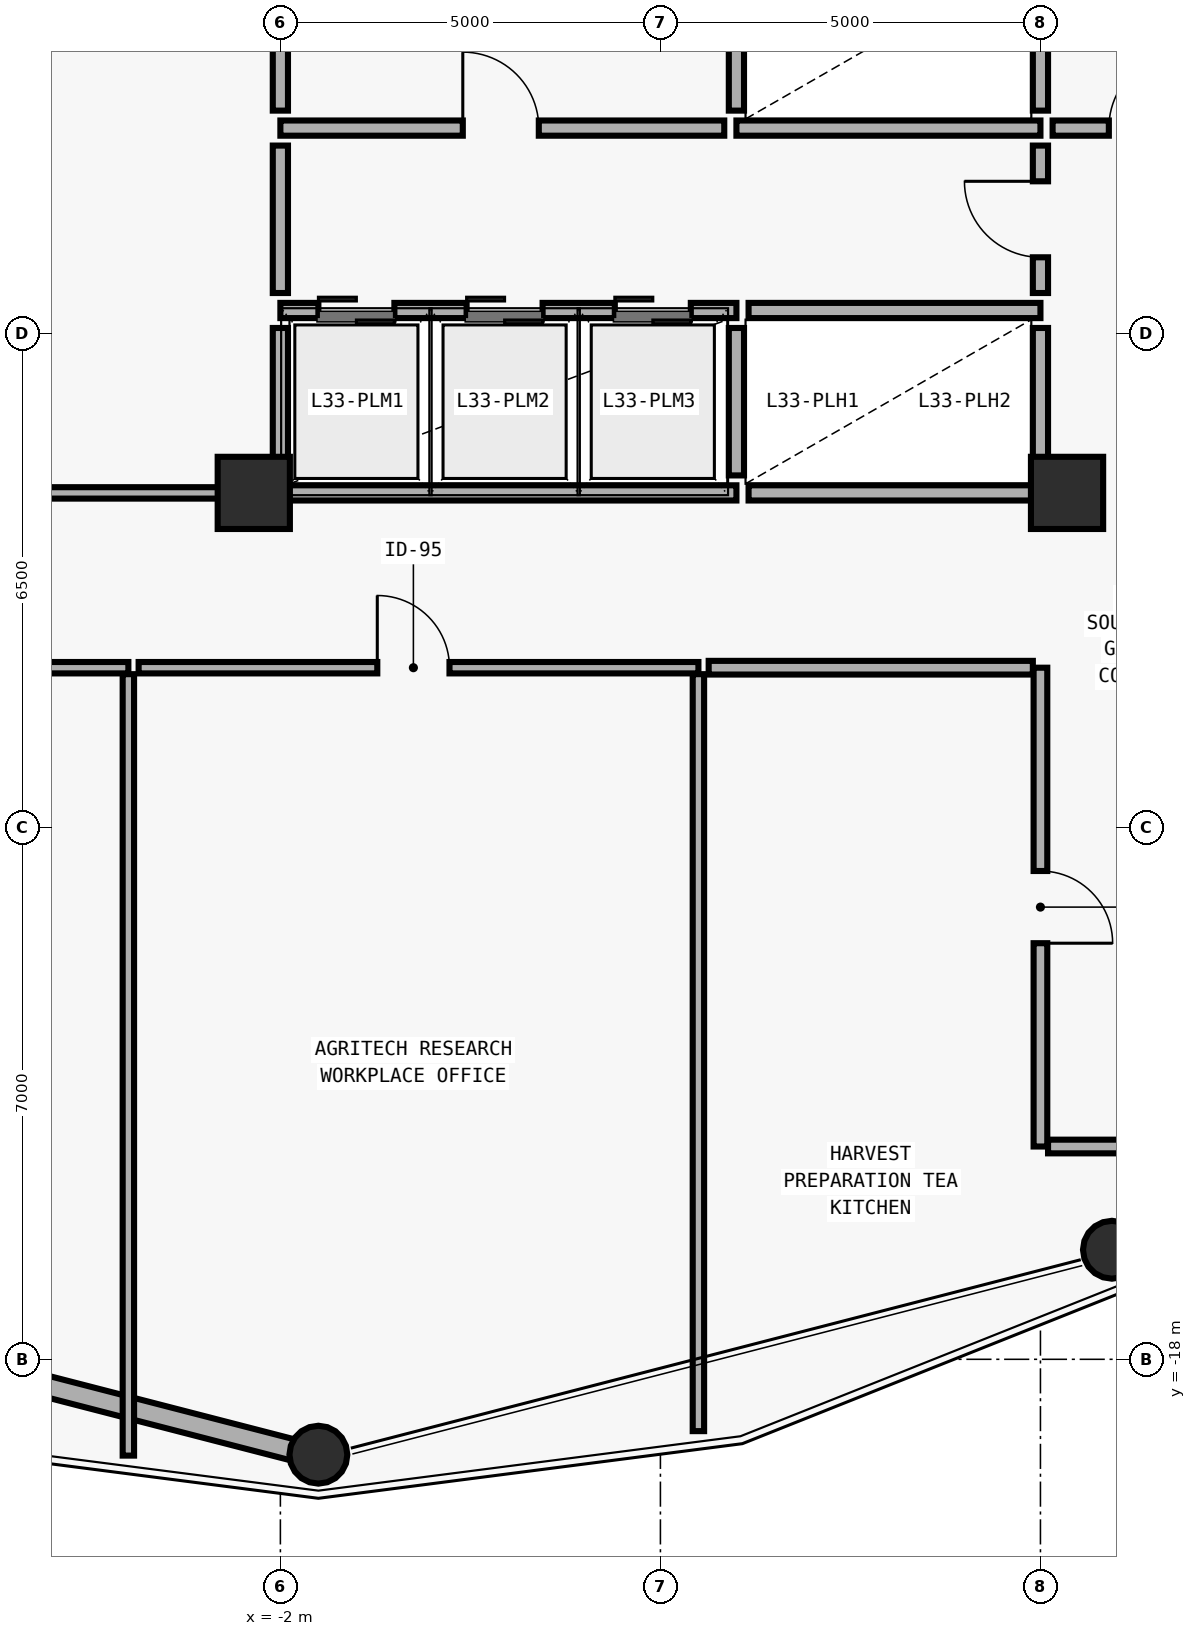
"""IFC4 building model, lengths in metres.
Left out: names, types, materials, properties, quantities, classifications, styles, units other than length and angle.
Written with IfcOpenShell. Run it as: python <this file> out.ifc"""

import sys

from ifc_helpers import new_model, si_unit, direction, frame, frame_2d, origin, origin_2d, place, context, subcontext, project, spatial, rectangle, hollow_circle, extrude, element, fill, save


model = new_model("IFC4")
c1 = context("Model", 3, precision=1e-05, world=origin(), true_north=direction((0.0, 1.0)))
c2 = subcontext(c1, "Body", "Model", "MODEL_VIEW")
j1 = project(units=[si_unit("LENGTHUNIT", "METRE"), si_unit("PLANEANGLEUNIT", "RADIAN")], contexts=[c1])
p1 = place(None, origin())
s1 = spatial("IfcSite", under=j1, at=p1, CompositionType="ELEMENT")
p2 = place(p1, origin())
s2 = spatial("IfcBuilding", under=s1, at=p2, CompositionType="ELEMENT")
p3 = place(p2, frame((0.0, 0.0, 134.4)))
s3 = spatial("IfcBuildingStorey", under=s2, at=p3, CompositionType="ELEMENT", Elevation=134.4)
for number, where, z_axis, x_axis in (
    (1, (-2.35, -6.6, 0.0), (0.0, 0.0, 1.0), (1.0, 0.0, 0.0)),
    (2, (8.35, -6.6, 0.0), (0.0, 0.0, 1.0), (1.0, 0.0, 0.0)),
):
    element("IfcColumn", number, at=place(p3, frame(where, z_axis=z_axis, x_axis=x_axis)), inside=s3, PredefinedType="COLUMN", context=c2, shape_type="SweptSolid", body=[
        extrude(rectangle(XDim=0.95, YDim=0.95, at=origin_2d()), origin(), (0.0, 0.0, 1.0), 3.875),
    ])
p4 = place(p3, frame((-1.5, -19.279, 0.0), z_axis=(0.0, 0.01241083843, 0.999922982579), x_axis=(-1.0, 0.0, 0.0)))
e3 = element("IfcColumn", 3, at=p4, inside=s3, PredefinedType="COLUMN", context=c2, shape_type="SweptSolid", body=[
    extrude(hollow_circle(Radius=0.381, WallThickness=0.028, at=origin_2d()), origin(), (0.0, 0.0, 1.0), 3.875),
])
p5 = place(p3, frame((8.958, -16.579, 0.0), z_axis=(-0.008630735893, 0.010709672276, 0.999905402184), x_axis=(-0.77862958397, -0.627483841199, 0.0)))
e4 = element("IfcColumn", 4, at=p5, inside=s3, PredefinedType="COLUMN", context=c2, shape_type="SweptSolid", body=[
    extrude(hollow_circle(Radius=0.381, WallThickness=0.028, at=origin_2d()), origin(), (0.0, 0.0, 1.0), 3.875),
])
p6 = place(p3, frame((-1.825, -19.195, 0.0), z_axis=(0.0, 0.0, 1.0), x_axis=(-0.968249285974, 0.249986640067, 0.0)))
e5 = element("IfcWall", 5, at=p6, inside=s3, PredefinedType="SOLIDWALL", context=c2, shape_type="SweptSolid", body=[
    extrude(rectangle(XDim=10.128, YDim=0.28, at=frame_2d((5.064, 0.0))), origin(), (0.0, 0.0, 1.0), 3.16),
])
p7 = place(p3, frame((4.0, -1.8, 0.0), z_axis=(0.0, 0.0, 1.0), x_axis=(1.0, 0.0, 0.0)))
e6 = element("IfcWall", 6, at=p7, inside=s3, PredefinedType="SOLIDWALL", context=c2, shape_type="SweptSolid", body=[
    extrude(rectangle(XDim=4.0, YDim=0.2, at=frame_2d((2.0, 0.0))), origin(), (0.0, 0.0, 1.0), 3.64),
])
p8 = place(p3, frame((4.0, -1.57, 0.0), z_axis=(0.0, 0.0, 1.0), x_axis=(0.0, 1.0, 0.0)))
e7 = element("IfcWall", 7, at=p8, inside=s3, PredefinedType="SOLIDWALL", context=c2, shape_type="SweptSolid", body=[
    extrude(rectangle(XDim=1.94, YDim=0.2, at=frame_2d((0.97, 0.0))), origin(), (0.0, 0.0, 1.0), 3.64),
])
p9 = place(p3, frame((8.0, -1.57, 0.0), z_axis=(0.0, 0.0, 1.0), x_axis=(0.0, 1.0, 0.0)))
e8 = element("IfcWall", 8, at=p9, inside=s3, PredefinedType="SOLIDWALL", context=c2, shape_type="SweptSolid", body=[
    extrude(rectangle(XDim=2.05, YDim=0.2, at=frame_2d((1.025, 0.0))), origin(), (0.0, 0.0, 1.0), 3.072),
])
p10 = place(p3, frame((-2.0, -4.2, 0.0), z_axis=(0.0, 0.0, 1.0), x_axis=(1.0, 0.0, 0.0)))
e9 = element("IfcWall", 9, at=p10, inside=s3, PredefinedType="SOLIDWALL", context=c2, shape_type="SweptSolid", body=[
    extrude(rectangle(XDim=6.0, YDim=0.2, at=frame_2d((3.0, 0.0))), origin(), (0.0, 0.0, 1.0), 3.64),
])
p11 = place(p10, frame((0.5, 0.0, 0.0)))
e10 = element("IfcOpeningElement", 10, at=p11, cuts=e9, PredefinedType="OPENING", context=c2, shape_type="SweptSolid", body=[
    extrude(rectangle(XDim=1.0, YDim=2.2, at=frame_2d((0.5, 1.1))), frame((0.0, 0.11, 0.0), z_axis=(0.0, -1.0, 0.0), x_axis=(1.0, 0.0, 0.0)), (0.0, 0.0, 1.0), 0.22),
])
p12 = place(p10, frame((2.45, 0.0, 0.0)))
e11 = element("IfcOpeningElement", 11, at=p12, cuts=e9, PredefinedType="OPENING", context=c2, shape_type="SweptSolid", body=[
    extrude(rectangle(XDim=1.0, YDim=2.2, at=frame_2d((0.5, 1.1))), frame((0.0, 0.11, 0.0), z_axis=(0.0, -1.0, 0.0), x_axis=(1.0, 0.0, 0.0)), (0.0, 0.0, 1.0), 0.22),
])
p13 = place(p10, frame((4.4, 0.0, 0.0)))
e12 = element("IfcOpeningElement", 12, at=p13, cuts=e9, PredefinedType="OPENING", context=c2, shape_type="SweptSolid", body=[
    extrude(rectangle(XDim=1.0, YDim=2.2, at=frame_2d((0.5, 1.1))), frame((0.0, 0.11, 0.0), z_axis=(0.0, -1.0, 0.0), x_axis=(1.0, 0.0, 0.0)), (0.0, 0.0, 1.0), 0.22),
])
p14 = place(p3, frame((-2.0, -6.6, 0.0), z_axis=(0.0, 0.0, 1.0), x_axis=(1.0, 0.0, 0.0)))
e13 = element("IfcWall", 13, at=p14, inside=s3, PredefinedType="SOLIDWALL", context=c2, shape_type="SweptSolid", body=[
    extrude(rectangle(XDim=6.0, YDim=0.2, at=frame_2d((3.0, 0.0))), origin(), (0.0, 0.0, 1.0), 3.222),
])
p15 = place(p3, frame((-2.0, -6.37, 0.0), z_axis=(0.0, 0.0, 1.0), x_axis=(0.0, 1.0, 0.0)))
e14 = element("IfcWall", 14, at=p15, inside=s3, PredefinedType="SOLIDWALL", context=c2, shape_type="SweptSolid", body=[
    extrude(rectangle(XDim=1.94, YDim=0.2, at=frame_2d((0.97, 0.0))), origin(), (0.0, 0.0, 1.0), 3.022),
])
p16 = place(p3, frame((4.16, -4.2, 0.0), z_axis=(0.0, 0.0, 1.0), x_axis=(1.0, 0.0, 0.0)))
e15 = element("IfcWall", 15, at=p16, inside=s3, PredefinedType="SOLIDWALL", context=c2, shape_type="SweptSolid", body=[
    extrude(rectangle(XDim=3.84, YDim=0.2, at=frame_2d((1.92, 0.0))), origin(), (0.0, 0.0, 1.0), 3.64),
])
p17 = place(p3, frame((4.16, -6.6, 0.0), z_axis=(0.0, 0.0, 1.0), x_axis=(1.0, 0.0, 0.0)))
e16 = element("IfcWall", 16, at=p17, inside=s3, PredefinedType="SOLIDWALL", context=c2, shape_type="SweptSolid", body=[
    extrude(rectangle(XDim=3.84, YDim=0.2, at=frame_2d((1.92, 0.0))), origin(), (0.0, 0.0, 1.0), 3.222),
])
p18 = place(p3, frame((4.0, -6.37, 0.0), z_axis=(0.0, 0.0, 1.0), x_axis=(0.0, 1.0, 0.0)))
e17 = element("IfcWall", 17, at=p18, inside=s3, PredefinedType="SOLIDWALL", context=c2, shape_type="SweptSolid", body=[
    extrude(rectangle(XDim=1.94, YDim=0.2, at=frame_2d((0.97, 0.0))), origin(), (0.0, 0.0, 1.0), 3.64),
])
p19 = place(p3, frame((8.0, -6.37, 0.0), z_axis=(0.0, 0.0, 1.0), x_axis=(0.0, 1.0, 0.0)))
e18 = element("IfcWall", 18, at=p19, inside=s3, PredefinedType="SOLIDWALL", context=c2, shape_type="SweptSolid", body=[
    extrude(rectangle(XDim=1.94, YDim=0.2, at=frame_2d((0.97, 0.0))), origin(), (0.0, 0.0, 1.0), 3.072),
])
p20 = place(p3, frame((8.0, -3.97, 0.0), z_axis=(0.0, 0.0, 1.0), x_axis=(0.0, 1.0, 0.0)))
e19 = element("IfcWall", 19, at=p20, inside=s3, PredefinedType="MOVABLE", context=c2, shape_type="SweptSolid", body=[
    extrude(rectangle(XDim=1.94, YDim=0.2, at=frame_2d((0.97, 0.0))), origin(), (0.0, 0.0, 1.0), 3.072),
])
p21 = place(p20, frame((0.47, 0.0, 0.0)))
e20 = element("IfcOpeningElement", 20, at=p21, cuts=e19, PredefinedType="OPENING", context=c2, shape_type="SweptSolid", body=[
    extrude(rectangle(XDim=1.0, YDim=2.1, at=frame_2d((0.5, 1.05))), frame((0.0, 0.11, 0.0), z_axis=(0.0, -1.0, 0.0), x_axis=(1.0, 0.0, 0.0)), (0.0, 0.0, 1.0), 0.22),
])
p22 = place(p3, frame((-2.0, -1.8, 0.0), z_axis=(0.0, 0.0, 1.0), x_axis=(1.0, 0.0, 0.0)))
e21 = element("IfcWall", 21, at=p22, inside=s3, PredefinedType="MOVABLE", context=c2, shape_type="SweptSolid", body=[
    extrude(rectangle(XDim=5.84, YDim=0.2, at=frame_2d((2.92, 0.0))), origin(), (0.0, 0.0, 1.0), 3.64),
])
p23 = place(p22, frame((2.4, 0.0, 0.0)))
e22 = element("IfcOpeningElement", 22, at=p23, cuts=e21, PredefinedType="OPENING", context=c2, shape_type="SweptSolid", body=[
    extrude(rectangle(XDim=1.0, YDim=2.1, at=frame_2d((0.5, 1.05))), frame((0.0, 0.11, 0.0), z_axis=(0.0, -1.0, 0.0), x_axis=(1.0, 0.0, 0.0)), (0.0, 0.0, 1.0), 0.22),
])
p24 = place(p3, frame((8.16, -1.8, 0.0), z_axis=(0.0, 0.0, 1.0), x_axis=(1.0, 0.0, 0.0)))
e23 = element("IfcWall", 23, at=p24, inside=s3, PredefinedType="MOVABLE", context=c2, shape_type="SweptSolid", body=[
    extrude(rectangle(XDim=2.64, YDim=0.2, at=frame_2d((1.32, 0.0))), origin(), (0.0, 0.0, 1.0), 3.64),
])
p25 = place(p24, frame((0.74, 0.0, 0.0)))
e24 = element("IfcOpeningElement", 24, at=p25, cuts=e23, PredefinedType="OPENING", context=c2, shape_type="SweptSolid", body=[
    extrude(rectangle(XDim=1.0, YDim=2.1, at=frame_2d((0.5, 1.05))), frame((0.0, 0.11, 0.0), z_axis=(0.0, -1.0, 0.0), x_axis=(1.0, 0.0, 0.0)), (0.0, 0.0, 1.0), 0.22),
])
p26 = place(p3, frame((-11.5, -8.9, 0.0), z_axis=(0.0, 0.0, 1.0), x_axis=(1.0, 0.0, 0.0)))
e25 = element("IfcWall", 25, at=p26, inside=s3, PredefinedType="PARTITIONING", context=c2, shape_type="SweptSolid", body=[
    extrude(rectangle(XDim=7.5, YDim=0.15, at=frame_2d((3.75, 0.0))), origin(), (0.0, 0.0, 1.0), 3.072),
])
p27 = place(p26, frame((3.275, 0.0, 0.0)))
e26 = element("IfcOpeningElement", 26, at=p27, cuts=e25, PredefinedType="OPENING", context=c2, shape_type="SweptSolid", body=[
    extrude(rectangle(XDim=0.95, YDim=2.1, at=frame_2d((0.475, 1.05))), frame((0.0, 0.085, 0.0), z_axis=(0.0, -1.0, 0.0), x_axis=(1.0, 0.0, 0.0)), (0.0, 0.0, 1.0), 0.17),
])
p28 = place(p3, frame((-3.865, -8.9, 0.0), z_axis=(0.0, 0.0, 1.0), x_axis=(1.0, 0.0, 0.0)))
e27 = element("IfcWall", 27, at=p28, inside=s3, PredefinedType="PARTITIONING", context=c2, shape_type="SweptSolid", body=[
    extrude(rectangle(XDim=7.365, YDim=0.15, at=frame_2d((3.683, 0.0))), origin(), (0.0, 0.0, 1.0), 3.64),
])
p29 = place(p28, frame((3.14, 0.0, 0.0)))
e28 = element("IfcOpeningElement", 28, at=p29, cuts=e27, PredefinedType="OPENING", context=c2, shape_type="SweptSolid", body=[
    extrude(rectangle(XDim=0.95, YDim=2.1, at=frame_2d((0.475, 1.05))), frame((0.0, 0.085, 0.0), z_axis=(0.0, -1.0, 0.0), x_axis=(1.0, 0.0, 0.0)), (0.0, 0.0, 1.0), 0.17),
])
p30 = place(p3, frame((8.0, -8.9, 0.0), z_axis=(0.0, 0.0, 1.0), x_axis=(0.0, -1.0, 0.0)))
e29 = element("IfcWall", 29, at=p30, inside=s3, PredefinedType="PLUMBINGWALL", context=c2, shape_type="SweptSolid", body=[
    extrude(rectangle(XDim=6.3, YDim=0.18, at=frame_2d((3.15, 0.0))), origin(), (0.0, 0.0, 1.0), 3.072),
])
p31 = place(p30, frame((2.675, 0.0, 0.0)))
e30 = element("IfcOpeningElement", 30, at=p31, cuts=e29, PredefinedType="OPENING", context=c2, shape_type="SweptSolid", body=[
    extrude(rectangle(XDim=0.95, YDim=2.1, at=frame_2d((0.475, 1.05))), frame((0.0, 0.1, 0.0), z_axis=(0.0, -1.0, 0.0), x_axis=(1.0, 0.0, 0.0)), (0.0, 0.0, 1.0), 0.2),
])
p32 = place(p3, frame((-2.16, -6.6, 0.0), z_axis=(0.0, 0.0, 1.0), x_axis=(-1.0, 0.0, 0.0)))
e31 = element("IfcWall", 31, at=p32, inside=s3, PredefinedType="PARTITIONING", context=c2, shape_type="SweptSolid", body=[
    extrude(rectangle(XDim=10.34, YDim=0.15, at=frame_2d((5.17, 0.0))), origin(), (0.0, 0.0, 1.0), 3.072),
])
p33 = place(p32, frame((4.615, 0.0, 0.0)))
e32 = element("IfcOpeningElement", 32, at=p33, cuts=e31, PredefinedType="OPENING", context=c2, shape_type="SweptSolid", body=[
    extrude(rectangle(XDim=0.95, YDim=2.1, at=frame_2d((0.475, 1.05))), frame((0.0, 0.085, 0.0), z_axis=(0.0, -1.0, 0.0), x_axis=(1.0, 0.0, 0.0)), (0.0, 0.0, 1.0), 0.17),
])
p34 = place(p3, frame((-2.0, -3.97, 0.0), z_axis=(0.0, 0.0, 1.0), x_axis=(0.0, 1.0, 0.0)))
e33 = element("IfcWall", 33, at=p34, inside=s3, PredefinedType="MOVABLE", context=c2, shape_type="SweptSolid", body=[
    extrude(rectangle(XDim=1.94, YDim=0.2, at=frame_2d((0.97, 0.0))), origin(), (0.0, 0.0, 1.0), 3.022),
])
p35 = place(p3, frame((-2.0, -1.57, 0.0), z_axis=(0.0, 0.0, 1.0), x_axis=(0.0, 1.0, 0.0)))
e34 = element("IfcWall", 34, at=p35, inside=s3, PredefinedType="MOVABLE", context=c2, shape_type="SweptSolid", body=[
    extrude(rectangle(XDim=2.05, YDim=0.2, at=frame_2d((1.025, 0.0))), origin(), (0.0, 0.0, 1.0), 3.022),
])
p36 = place(p3, frame((-4.0, -8.985, 0.0), z_axis=(0.0, 0.0, 1.0), x_axis=(0.0, -1.0, 0.0)))
e35 = element("IfcWall", 35, at=p36, inside=s3, PredefinedType="PARTITIONING", context=c2, shape_type="SweptSolid", body=[
    extrude(rectangle(XDim=10.282, YDim=0.15, at=frame_2d((5.141, 0.0))), origin(), (0.0, 0.0, 1.0), 3.64),
])
p37 = place(p3, frame((3.5, -8.985, 0.0), z_axis=(0.0, 0.0, 1.0), x_axis=(0.0, -1.0, 0.0)))
e36 = element("IfcWall", 36, at=p37, inside=s3, PredefinedType="PARTITIONING", context=c2, shape_type="SweptSolid", body=[
    extrude(rectangle(XDim=9.96, YDim=0.15, at=frame_2d((4.98, 0.0))), origin(), (0.0, 0.0, 1.0), 3.64),
])
p38 = place(p3, frame((3.635, -8.9, 0.0), z_axis=(0.0, 0.0, 1.0), x_axis=(1.0, 0.0, 0.0)))
e37 = element("IfcWall", 37, at=p38, inside=s3, PredefinedType="PLUMBINGWALL", context=c2, shape_type="SweptSolid", body=[
    extrude(rectangle(XDim=4.265, YDim=0.18, at=frame_2d((2.132, 0.0))), origin(), (0.0, 0.0, 1.0), 3.64),
])
p39 = place(p3, frame((8.1, -15.2, 0.0), z_axis=(0.0, 0.0, 1.0), x_axis=(1.0, 0.0, 0.0)))
e38 = element("IfcWall", 38, at=p39, inside=s3, PredefinedType="PLUMBINGWALL", context=c2, shape_type="SweptSolid", body=[
    extrude(rectangle(XDim=2.6, YDim=0.18, at=frame_2d((1.3, 0.0))), origin(), (0.0, 0.0, 1.0), 3.64),
])
p40 = place(p21, origin())
e39 = element("IfcDoor", 39, at=p40, inside=s3, OperationType="SINGLE_SWING_RIGHT", PredefinedType="DOOR", context=c2, shape_type="SweptSolid", body=[
    extrude(rectangle(XDim=1.0, YDim=2.1, at=frame_2d((0.5, 1.05))), frame((0.0, 0.025, 0.0), z_axis=(0.0, -1.0, 0.0), x_axis=(1.0, 0.0, 0.0)), (0.0, 0.0, 1.0), 0.05),
])
fill(e20, e39)
p41 = place(p23, origin())
e40 = element("IfcDoor", 40, at=p41, inside=s3, OperationType="SINGLE_SWING_LEFT", PredefinedType="DOOR", context=c2, shape_type="SweptSolid", body=[
    extrude(rectangle(XDim=1.0, YDim=2.1, at=frame_2d((0.5, 1.05))), frame((0.0, 0.025, 0.0), z_axis=(0.0, -1.0, 0.0), x_axis=(1.0, 0.0, 0.0)), (0.0, 0.0, 1.0), 0.05),
])
fill(e22, e40)
p42 = place(p25, origin())
e41 = element("IfcDoor", 41, at=p42, inside=s3, OperationType="SINGLE_SWING_RIGHT", PredefinedType="DOOR", context=c2, shape_type="SweptSolid", body=[
    extrude(rectangle(XDim=1.0, YDim=2.1, at=frame_2d((0.5, 1.05))), frame((0.0, 0.025, 0.0), z_axis=(0.0, -1.0, 0.0), x_axis=(1.0, 0.0, 0.0)), (0.0, 0.0, 1.0), 0.05),
])
fill(e24, e41)
p43 = place(p29, origin())
e42 = element("IfcDoor", 42, at=p43, inside=s3, OperationType="SINGLE_SWING_LEFT", PredefinedType="DOOR", context=c2, shape_type="SweptSolid", body=[
    extrude(rectangle(XDim=0.95, YDim=2.1, at=frame_2d((0.475, 1.05))), frame((0.0, 0.025, 0.0), z_axis=(0.0, -1.0, 0.0), x_axis=(1.0, 0.0, 0.0)), (0.0, 0.0, 1.0), 0.05),
])
fill(e28, e42)
p44 = place(p31, origin())
e43 = element("IfcDoor", 43, at=p44, inside=s3, OperationType="SINGLE_SWING_RIGHT", PredefinedType="DOOR", context=c2, shape_type="SweptSolid", body=[
    extrude(rectangle(XDim=0.95, YDim=2.1, at=frame_2d((0.475, 1.05))), frame((0.0, 0.025, 0.0), z_axis=(0.0, -1.0, 0.0), x_axis=(1.0, 0.0, 0.0)), (0.0, 0.0, 1.0), 0.05),
])
fill(e30, e43)
p45 = place(p11, origin())
e44 = element("IfcDoor", 44, at=p45, inside=s3, OperationType="DOUBLE_DOOR_SLIDING", PredefinedType="DOOR", context=c2, shape_type="SweptSolid", body=[
    extrude(rectangle(XDim=1.0, YDim=2.2, at=frame_2d((0.5, 1.1))), frame((0.0, 0.025, 0.0), z_axis=(0.0, -1.0, 0.0), x_axis=(1.0, 0.0, 0.0)), (0.0, 0.0, 1.0), 0.05),
])
fill(e10, e44)
p46 = place(p12, origin())
e45 = element("IfcDoor", 45, at=p46, inside=s3, OperationType="DOUBLE_DOOR_SLIDING", PredefinedType="DOOR", context=c2, shape_type="SweptSolid", body=[
    extrude(rectangle(XDim=1.0, YDim=2.2, at=frame_2d((0.5, 1.1))), frame((0.0, 0.025, 0.0), z_axis=(0.0, -1.0, 0.0), x_axis=(1.0, 0.0, 0.0)), (0.0, 0.0, 1.0), 0.05),
])
fill(e11, e45)
p47 = place(p13, origin())
e46 = element("IfcDoor", 46, at=p47, inside=s3, OperationType="DOUBLE_DOOR_SLIDING", PredefinedType="DOOR", context=c2, shape_type="SweptSolid", body=[
    extrude(rectangle(XDim=1.0, YDim=2.2, at=frame_2d((0.5, 1.1))), frame((0.0, 0.025, 0.0), z_axis=(0.0, -1.0, 0.0), x_axis=(1.0, 0.0, 0.0)), (0.0, 0.0, 1.0), 0.05),
])
fill(e12, e46)
save(model, sys.argv[1])
